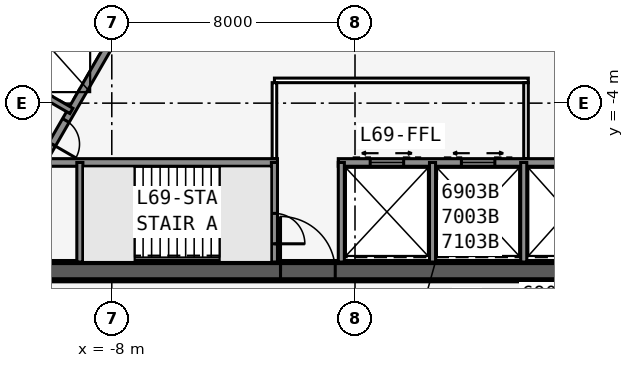
"""IFC4 building model, lengths in metres.
Left out: names, types, materials, properties, quantities, classifications, styles, units other than length and angle.
Written with IfcOpenShell. Run it as: python <this file> out.ifc"""

import sys

from ifc_helpers import new_model, si_unit, direction, frame, frame_2d, origin, place, context, subcontext, project, spatial, rectangle, extrude, element, fill, save


model = new_model("IFC4")
c1 = context("Model", 3, precision=1e-05, world=origin(), true_north=direction((0.0, 1.0)))
c2 = subcontext(c1, "Body", "Model", "MODEL_VIEW")
j1 = project(units=[si_unit("LENGTHUNIT", "METRE"), si_unit("PLANEANGLEUNIT", "RADIAN")], contexts=[c1])
p1 = place(None, origin())
s1 = spatial("IfcSite", under=j1, at=p1, CompositionType="ELEMENT")
p2 = place(p1, origin())
s2 = spatial("IfcBuilding", under=s1, at=p2, CompositionType="ELEMENT")
p3 = place(p2, frame((0.0, 0.0, 260.9)))
s3 = spatial("IfcBuildingStorey", under=s2, at=p3, CompositionType="ELEMENT", Elevation=260.9)
p4 = place(p3, frame((-16.5, -9.526, 0.0), z_axis=(0.0, 0.0, 1.0), x_axis=(1.0, 0.0, 0.0)))
e1 = element("IfcWall", 1, at=p4, inside=s3, PredefinedType="SHEAR", context=c2, shape_type="SweptSolid", body=[
    extrude(rectangle(XDim=33.0, YDim=0.6, at=frame_2d((16.5, 0.0))), origin(), (0.0, 0.0, 1.0), 3.6),
])
p5 = place(p4, frame((14.05, 0.0, 0.0)))
e2 = element("IfcOpeningElement", 2, at=p5, cuts=e1, PredefinedType="OPENING", context=c2, shape_type="SweptSolid", body=[
    extrude(rectangle(XDim=1.8, YDim=2.13, at=frame_2d((0.9, 1.065))), frame((0.0, 0.31, 0.0), z_axis=(0.0, -1.0, 0.0), x_axis=(1.0, 0.0, 0.0)), (0.0, 0.0, 1.0), 0.62),
])
p6 = place(p3, frame((-10.183, -5.951, 0.0), z_axis=(0.0, 0.0, 1.0), x_axis=(1.0, 0.0, 0.0)))
e3 = element("IfcWall", 3, at=p6, inside=s3, PredefinedType="SOLIDWALL", context=c2, shape_type="SweptSolid", body=[
    extrude(rectangle(XDim=7.633, YDim=0.25, at=frame_2d((3.816, 0.0))), origin(), (0.0, 0.0, 1.0), 3.435),
])
p7 = place(p3, frame((-0.55, -5.951, 0.0), z_axis=(0.0, 0.0, 1.0), x_axis=(1.0, 0.0, 0.0)))
e4 = element("IfcWall", 4, at=p7, inside=s3, PredefinedType="SOLIDWALL", context=c2, shape_type="SweptSolid", body=[
    extrude(rectangle(XDim=10.733, YDim=0.25, at=frame_2d((5.366, 0.0))), origin(), (0.0, 0.0, 1.0), 3.435),
])
p8 = place(p7, frame((9.314, 0.0, 0.0)))
e5 = element("IfcOpeningElement", 5, at=p8, cuts=e4, PredefinedType="OPENING", context=c2, shape_type="SweptSolid", body=[
    extrude(rectangle(XDim=0.9, YDim=2.13, at=frame_2d((0.45, 1.065))), frame((0.0, 0.135, 0.0), z_axis=(0.0, -1.0, 0.0), x_axis=(1.0, 0.0, 0.0)), (0.0, 0.0, 1.0), 0.27),
])
p9 = place(p7, frame((1.05, 0.0, 0.0)))
e6 = element("IfcOpeningElement", 6, at=p9, cuts=e4, PredefinedType="OPENING", context=c2, shape_type="SweptSolid", body=[
    extrude(rectangle(XDim=1.1, YDim=2.13, at=frame_2d((0.55, 1.065))), frame((0.0, 0.135, 0.0), z_axis=(0.0, -1.0, 0.0), x_axis=(1.0, 0.0, 0.0)), (0.0, 0.0, 1.0), 0.27),
])
p10 = place(p7, frame((4.05, 0.0, 0.0)))
e7 = element("IfcOpeningElement", 7, at=p10, cuts=e4, PredefinedType="OPENING", context=c2, shape_type="SweptSolid", body=[
    extrude(rectangle(XDim=1.1, YDim=2.13, at=frame_2d((0.55, 1.065))), frame((0.0, 0.135, 0.0), z_axis=(0.0, -1.0, 0.0), x_axis=(1.0, 0.0, 0.0)), (0.0, 0.0, 1.0), 0.27),
])
p11 = place(p3, frame((-9.05, -5.951, 0.0), z_axis=(0.0, 0.0, 1.0), x_axis=(0.0, -1.0, 0.0)))
e8 = element("IfcWall", 8, at=p11, inside=s3, PredefinedType="SOLIDWALL", context=c2, shape_type="SweptSolid", body=[
    extrude(rectangle(XDim=3.275, YDim=0.2, at=frame_2d((1.637, 0.0))), origin(), (0.0, 0.0, 1.0), 3.435),
])
p12 = place(p3, frame((-2.65, -5.951, 0.0), z_axis=(0.0, 0.0, 1.0), x_axis=(0.0, -1.0, 0.0)))
e9 = element("IfcWall", 9, at=p12, inside=s3, PredefinedType="SOLIDWALL", context=c2, shape_type="SweptSolid", body=[
    extrude(rectangle(XDim=3.275, YDim=0.2, at=frame_2d((1.637, 0.0))), origin(), (0.0, 0.0, 1.0), 3.435),
])
p13 = place(p12, frame((1.675, 0.0, 0.0)))
e10 = element("IfcOpeningElement", 10, at=p13, cuts=e9, PredefinedType="OPENING", context=c2, shape_type="SweptSolid", body=[
    extrude(rectangle(XDim=1.0, YDim=2.13, at=frame_2d((0.5, 1.065))), frame((0.0, 0.11, 0.0), z_axis=(0.0, -1.0, 0.0), x_axis=(1.0, 0.0, 0.0)), (0.0, 0.0, 1.0), 0.22),
])
for number, where, z_axis, x_axis in (
    (11, (-0.45, -5.951, 0.0), (0.0, 0.0, 1.0), (0.0, -1.0, 0.0)),
    (12, (2.55, -5.951, 0.0), (0.0, 0.0, 1.0), (0.0, -1.0, 0.0)),
    (13, (5.55, -5.951, 0.0), (0.0, 0.0, 1.0), (0.0, -1.0, 0.0)),
):
    element("IfcWall", number, at=place(p3, frame(where, z_axis=z_axis, x_axis=x_axis)), inside=s3, PredefinedType="SOLIDWALL", context=c2, shape_type="SweptSolid", body=[
        extrude(rectangle(XDim=3.275, YDim=0.2, at=frame_2d((1.637, 0.0))), origin(), (0.0, 0.0, 1.0), 3.435),
    ])
p14 = place(p3, frame((16.5, -9.526, 0.0), z_axis=(0.0, 0.0, 1.0), x_axis=(-0.499999749417, 0.866025548458, 0.0)))
e14 = element("IfcWall", 14, at=p14, inside=s3, PredefinedType="SHEAR", context=c2, shape_type="SweptSolid", body=[
    extrude(rectangle(XDim=33.0, YDim=0.6, at=frame_2d((16.5, 0.0))), origin(), (0.0, 0.0, 1.0), 3.6),
])
p15 = place(p14, frame((14.15, 0.0, 0.0)))
e15 = element("IfcOpeningElement", 15, at=p15, cuts=e14, PredefinedType="OPENING", context=c2, shape_type="SweptSolid", body=[
    extrude(rectangle(XDim=1.8, YDim=2.13, at=frame_2d((0.9, 1.065))), frame((0.0, 0.31, 0.0), z_axis=(0.0, -1.0, 0.0), x_axis=(1.0, 0.0, 0.0)), (0.0, 0.0, 1.0), 0.62),
])
p16 = place(p14, frame((12.6, 0.0, 0.0)))
e16 = element("IfcOpeningElement", 16, at=p16, cuts=e14, PredefinedType="OPENING", context=c2, shape_type="SweptSolid", body=[
    extrude(rectangle(XDim=1.0, YDim=2.13, at=frame_2d((0.5, 1.065))), frame((0.0, 0.31, 0.0), z_axis=(0.0, -1.0, 0.0), x_axis=(1.0, 0.0, 0.0)), (0.0, 0.0, 1.0), 0.62),
])
p17 = place(p3, frame((10.245, -5.843, 0.0), z_axis=(0.0, 0.0, 1.0), x_axis=(-0.499993009313, 0.866029439822, 0.0)))
e17 = element("IfcWall", 17, at=p17, inside=s3, PredefinedType="SOLIDWALL", context=c2, shape_type="SweptSolid", body=[
    extrude(rectangle(XDim=7.733, YDim=0.25, at=frame_2d((3.866, 0.0))), origin(), (0.0, 0.0, 1.0), 3.435),
])
p18 = place(p3, frame((0.0, 19.052, 0.0), z_axis=(0.0, 0.0, 1.0), x_axis=(-0.499999749417, -0.866025548458, 0.0)))
e18 = element("IfcWall", 18, at=p18, inside=s3, PredefinedType="SHEAR", context=c2, shape_type="SweptSolid", body=[
    extrude(rectangle(XDim=33.0, YDim=0.6, at=frame_2d((16.5, 0.0))), origin(), (0.0, 0.0, 1.0), 3.6),
])
p19 = place(p18, frame((14.15, 0.0, 0.0)))
e19 = element("IfcOpeningElement", 19, at=p19, cuts=e18, PredefinedType="OPENING", context=c2, shape_type="SweptSolid", body=[
    extrude(rectangle(XDim=1.8, YDim=2.13, at=frame_2d((0.9, 1.065))), frame((0.0, 0.31, 0.0), z_axis=(0.0, -1.0, 0.0), x_axis=(1.0, 0.0, 0.0)), (0.0, 0.0, 1.0), 0.62),
])
p20 = place(p18, frame((12.6, 0.0, 0.0)))
e20 = element("IfcOpeningElement", 20, at=p20, cuts=e18, PredefinedType="OPENING", context=c2, shape_type="SweptSolid", body=[
    extrude(rectangle(XDim=1.0, YDim=2.13, at=frame_2d((0.5, 1.065))), frame((0.0, 0.31, 0.0), z_axis=(0.0, -1.0, 0.0), x_axis=(1.0, 0.0, 0.0)), (0.0, 0.0, 1.0), 0.62),
])
p21 = place(p3, frame((-4.929, 3.365, 0.0), z_axis=(0.0, 0.0, 1.0), x_axis=(-0.499991433582, -0.866030349552, 0.0)))
e21 = element("IfcWall", 21, at=p21, inside=s3, PredefinedType="SOLIDWALL", context=c2, shape_type="SweptSolid", body=[
    extrude(rectangle(XDim=10.633, YDim=0.25, at=frame_2d((5.316, 0.0))), origin(), (0.0, 0.0, 1.0), 3.435),
])
p22 = place(p21, frame((9.164, 0.0, 0.0)))
e22 = element("IfcOpeningElement", 22, at=p22, cuts=e21, PredefinedType="OPENING", context=c2, shape_type="SweptSolid", body=[
    extrude(rectangle(XDim=0.9, YDim=2.13, at=frame_2d((0.45, 1.065))), frame((0.0, 0.135, 0.0), z_axis=(0.0, -1.0, 0.0), x_axis=(1.0, 0.0, 0.0)), (0.0, 0.0, 1.0), 0.27),
])
p23 = place(p21, frame((1.1, 0.0, 0.0)))
e23 = element("IfcOpeningElement", 23, at=p23, cuts=e21, PredefinedType="OPENING", context=c2, shape_type="SweptSolid", body=[
    extrude(rectangle(XDim=0.9, YDim=2.13, at=frame_2d((0.45, 1.065))), frame((0.0, 0.135, 0.0), z_axis=(0.0, -1.0, 0.0), x_axis=(1.0, 0.0, 0.0)), (0.0, 0.0, 1.0), 0.27),
])
p24 = place(p21, frame((4.0, 0.0, 0.0)))
e24 = element("IfcOpeningElement", 24, at=p24, cuts=e21, PredefinedType="OPENING", context=c2, shape_type="SweptSolid", body=[
    extrude(rectangle(XDim=0.9, YDim=2.13, at=frame_2d((0.45, 1.065))), frame((0.0, 0.135, 0.0), z_axis=(0.0, -1.0, 0.0), x_axis=(1.0, 0.0, 0.0)), (0.0, 0.0, 1.0), 0.27),
])
p25 = place(p3, frame((-9.329, -4.256, 0.0), z_axis=(0.0, 0.0, 1.0), x_axis=(-0.866027924134, 0.499995634601, 0.0)))
e25 = element("IfcWall", 25, at=p25, inside=s3, PredefinedType="SOLIDWALL", context=c2, shape_type="SweptSolid", body=[
    extrude(rectangle(XDim=3.275, YDim=0.2, at=frame_2d((1.637, 0.0))), origin(), (0.0, 0.0, 1.0), 3.435),
])
p26 = place(p3, frame((20.177, -11.245, 0.0), z_axis=(0.0, 0.0, 1.0), x_axis=(-0.499998875317, 0.866026053119, 0.0)))
e26 = element("IfcWall", 26, at=p26, inside=s3, PredefinedType="PARTITIONING", context=c2, shape_type="SweptSolid", body=[
    extrude(rectangle(XDim=39.654, YDim=0.15, at=frame_2d((19.827, 0.0))), origin(), (0.0, 0.0, 1.0), 3.435),
])
p27 = place(p26, frame((10.352, 0.0, 0.0)))
e27 = element("IfcOpeningElement", 27, at=p27, cuts=e26, PredefinedType="OPENING", context=c2, shape_type="SweptSolid", body=[
    extrude(rectangle(XDim=0.95, YDim=2.13, at=frame_2d((0.475, 1.065))), frame((0.0, 0.085, 0.0), z_axis=(0.0, -1.0, 0.0), x_axis=(1.0, 0.0, 0.0)), (0.0, 0.0, 1.0), 0.17),
])
p28 = place(p3, frame((-2.65, -3.251, 0.0), z_axis=(0.0, 0.0, 1.0), x_axis=(1.0, 0.0, 0.0)))
e28 = element("IfcWall", 28, at=p28, inside=s3, PredefinedType="PARTITIONING", context=c2, shape_type="SweptSolid", body=[
    extrude(rectangle(XDim=8.35, YDim=0.15, at=frame_2d((4.175, 0.0))), origin(), (0.0, 0.0, 1.0), 3.435),
])
for number, where, z_axis, x_axis in (
    (29, (-2.65, -5.826, 0.0), (0.0, 0.0, 1.0), (0.0, 1.0, 0.0)),
    (30, (5.625, -5.826, 0.0), (0.0, 0.0, 1.0), (0.0, 1.0, 0.0)),
):
    element("IfcWall", number, at=place(p3, frame(where, z_axis=z_axis, x_axis=x_axis)), inside=s3, PredefinedType="PARTITIONING", context=c2, shape_type="SweptSolid", body=[
        extrude(rectangle(XDim=2.5, YDim=0.15, at=frame_2d((1.25, 0.0))), origin(), (0.0, 0.0, 1.0), 3.435),
    ])
p29 = place(p3, frame((-7.247, -7.576, 0.0), z_axis=(0.0, 0.0, 1.0), x_axis=(1.0, 0.0, 0.0)))
e31 = element("IfcWall", 31, at=p29, inside=s3, PredefinedType="SOLIDWALL", context=c2, shape_type="SweptSolid", body=[
    extrude(rectangle(XDim=2.794, YDim=0.1, at=frame_2d((1.397, 0.0))), origin(), (0.0, 0.0, 1.0), 3.6),
])
p30 = place(p5, origin())
e32 = element("IfcDoor", 32, at=p30, inside=s3, OperationType="DOUBLE_DOOR_SINGLE_SWING", PredefinedType="DOOR", context=c2, shape_type="SweptSolid", body=[
    extrude(rectangle(XDim=1.8, YDim=2.13, at=frame_2d((0.9, 1.065))), frame((0.0, 0.025, 0.0), z_axis=(0.0, -1.0, 0.0), x_axis=(1.0, 0.0, 0.0)), (0.0, 0.0, 1.0), 0.05),
])
fill(e2, e32)
p31 = place(p13, origin())
e33 = element("IfcDoor", 33, at=p31, inside=s3, OperationType="SINGLE_SWING_RIGHT", PredefinedType="DOOR", context=c2, shape_type="SweptSolid", body=[
    extrude(rectangle(XDim=1.0, YDim=2.13, at=frame_2d((0.5, 1.065))), frame((0.0, 0.025, 0.0), z_axis=(0.0, -1.0, 0.0), x_axis=(1.0, 0.0, 0.0)), (0.0, 0.0, 1.0), 0.05),
])
fill(e10, e33)
p32 = place(p22, origin())
e34 = element("IfcDoor", 34, at=p32, inside=s3, OperationType="SINGLE_SWING_RIGHT", PredefinedType="DOOR", context=c2, shape_type="SweptSolid", body=[
    extrude(rectangle(XDim=0.9, YDim=2.13, at=frame_2d((0.45, 1.065))), frame((0.0, 0.025, 0.0), z_axis=(0.0, -1.0, 0.0), x_axis=(1.0, 0.0, 0.0)), (0.0, 0.0, 1.0), 0.05),
])
fill(e22, e34)
p33 = place(p9, origin())
e35 = element("IfcDoor", 35, at=p33, inside=s3, OperationType="DOUBLE_DOOR_SLIDING", PredefinedType="USERDEFINED", context=c2, shape_type="SweptSolid", body=[
    extrude(rectangle(XDim=1.1, YDim=2.13, at=frame_2d((0.55, 1.065))), frame((0.0, 0.025, 0.0), z_axis=(0.0, -1.0, 0.0), x_axis=(1.0, 0.0, 0.0)), (0.0, 0.0, 1.0), 0.05),
])
fill(e6, e35)
p34 = place(p10, origin())
e36 = element("IfcDoor", 36, at=p34, inside=s3, OperationType="DOUBLE_DOOR_SLIDING", PredefinedType="USERDEFINED", context=c2, shape_type="SweptSolid", body=[
    extrude(rectangle(XDim=1.1, YDim=2.13, at=frame_2d((0.55, 1.065))), frame((0.0, 0.025, 0.0), z_axis=(0.0, -1.0, 0.0), x_axis=(1.0, 0.0, 0.0)), (0.0, 0.0, 1.0), 0.05),
])
fill(e7, e36)
save(model, sys.argv[1])
